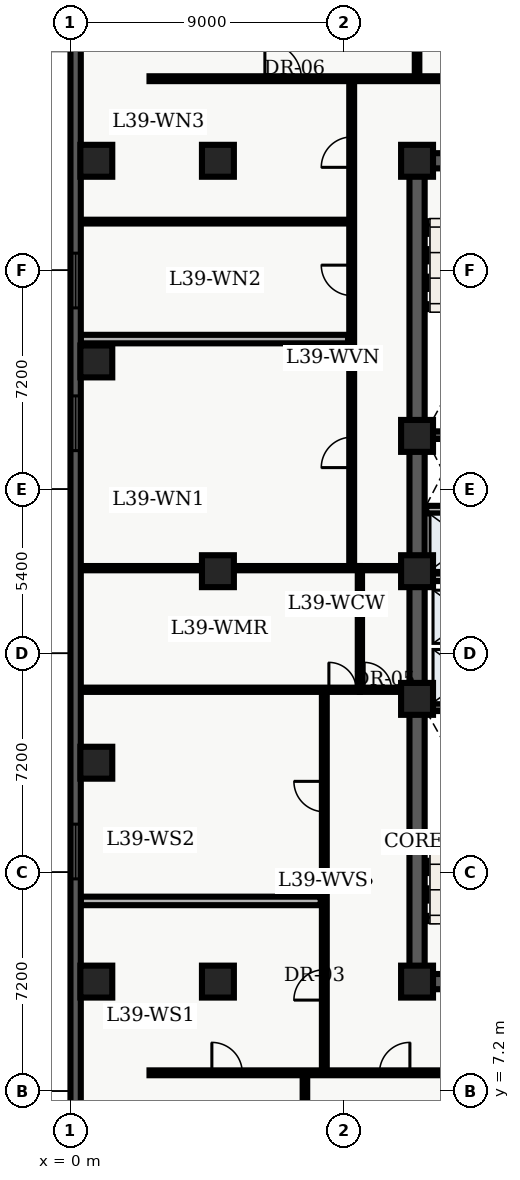
"""IFC4 building model, lengths in metres.
Left out: names, types, materials, properties, quantities, classifications, styles, units other than length and angle.
Written with IfcOpenShell. Run it as: python <this file> out.ifc"""

import sys

from ifc_helpers import new_model, entity, si_unit, converted_unit, direction, frame, origin_with_axes, origin_2d_with_axis, place, context, subcontext, project, spatial, polyline, rectangle, outline, extrude, element, fill, save


model = new_model("IFC4")
c1 = context("Model", 3, precision=1e-05, world=origin_with_axes(), true_north=direction((0.0, 1.0)))
c2 = subcontext(c1, "Body", "Model", "MODEL_VIEW")
j1 = project(units=[si_unit("LENGTHUNIT", "METRE"), converted_unit("PLANEANGLEUNIT", "DEGREE", entity("IfcPlaneAngleMeasure", 0.017), si_unit("PLANEANGLEUNIT", "RADIAN"), dimensions=[0, 0, 0, 0, 0, 0, 0])], contexts=[c1])
p1 = place(None, origin_with_axes())
s1 = spatial("IfcSite", under=j1, at=p1, CompositionType="ELEMENT")
p2 = place(p1, origin_with_axes())
s2 = spatial("IfcBuilding", under=s1, at=p2, CompositionType="ELEMENT")
p3 = place(p2, frame((0.0, 0.0, 160.2), z_axis=(0.0, 0.0, 1.0), x_axis=(1.0, 0.0, 0.0)))
s3 = spatial("IfcBuildingStorey", under=s2, at=p3, CompositionType="ELEMENT", Elevation=160.2)
p4 = place(p3, frame((11.4, 10.8, 0.0), z_axis=(0.0, 0.0, 1.0), x_axis=(0.0, 1.0, 0.0)))
e1 = element("IfcWall", 1, at=p4, inside=s3, PredefinedType="SHEAR", context=c2, shape_type="SweptSolid", body=[
    extrude(outline(polyline([(0.0, -0.25), (27.0, -0.25), (27.0, 0.25), (0.0, 0.25), (0.0, -0.25)])), origin_with_axes(), (0.0, 0.0, 1.0), 3.66),
])
p5 = place(p3, frame((11.4, 10.8, 0.0), z_axis=(0.0, 0.0, 1.0), x_axis=(1.0, 0.0, 0.0)))
e2 = element("IfcWall", 2, at=p5, inside=s3, PredefinedType="SHEAR", context=c2, shape_type="SweptSolid", body=[
    extrude(outline(polyline([(0.0, -0.25), (7.2, -0.25), (7.2, 0.25), (0.0, 0.25), (0.0, -0.25)])), origin_with_axes(), (0.0, 0.0, 1.0), 3.66),
])
p6 = place(p5, frame((2.625, 0.0, 0.0), z_axis=(0.0, 0.0, 1.0), x_axis=(1.0, 0.0, 0.0)))
e3 = element("IfcOpeningElement", 3, at=p6, cuts=e2, PredefinedType="OPENING", context=c2, shape_type="SweptSolid", body=[
    extrude(rectangle(XDim=1.05, YDim=0.52, at=origin_2d_with_axis()), origin_with_axes(), (0.0, 0.0, 1.0), 2.15),
])
p7 = place(p3, frame((11.4, 37.8, 0.0), z_axis=(0.0, 0.0, 1.0), x_axis=(1.0, 0.0, 0.0)))
e4 = element("IfcWall", 4, at=p7, inside=s3, PredefinedType="SHEAR", context=c2, shape_type="SweptSolid", body=[
    extrude(outline(polyline([(0.0, -0.25), (7.2, -0.25), (7.2, 0.25), (0.0, 0.25), (0.0, -0.25)])), origin_with_axes(), (0.0, 0.0, 1.0), 3.66),
])
p8 = place(p7, frame((2.625, 0.0, 0.0), z_axis=(0.0, 0.0, 1.0), x_axis=(1.0, 0.0, 0.0)))
e5 = element("IfcOpeningElement", 5, at=p8, cuts=e4, PredefinedType="OPENING", context=c2, shape_type="SweptSolid", body=[
    extrude(rectangle(XDim=1.05, YDim=0.52, at=origin_2d_with_axis()), origin_with_axes(), (0.0, 0.0, 1.0), 2.15),
])
for number, where, z_axis, x_axis in (
    (6, (11.65, 19.825, 0.0), (0.0, 0.0, 1.0), (1.0, 0.0, 0.0)),
    (7, (11.65, 28.775, 0.0), (0.0, 0.0, 1.0), (1.0, 0.0, 0.0)),
):
    element("IfcWall", number, at=place(p3, frame(where, z_axis=z_axis, x_axis=x_axis)), inside=s3, PredefinedType="SHEAR", context=c2, shape_type="SweptSolid", body=[
        extrude(outline(polyline([(0.0, -0.125), (6.7, -0.125), (6.7, 0.125), (0.0, 0.125), (0.0, -0.125)])), origin_with_axes(), (0.0, 0.0, 1.0), 3.66),
    ])
p9 = place(p3, frame((11.7, 24.1, 0.0), z_axis=(0.0, 0.0, 1.0), x_axis=(1.0, 0.0, 0.0)))
e8 = element("IfcWall", 8, at=p9, inside=s3, PredefinedType="SOLIDWALL", context=c2, shape_type="SweptSolid", body=[
    extrude(outline(polyline([(0.0, -0.125), (6.6, -0.125), (6.6, 0.125), (0.0, 0.125), (0.0, -0.125)])), origin_with_axes(), (0.0, 0.0, 1.0), 2.7),
])
p10 = place(p9, frame((3.75, 0.0, 0.0), z_axis=(0.0, 0.0, 1.0), x_axis=(1.0, 0.0, 0.0)))
e9 = element("IfcOpeningElement", 9, at=p10, cuts=e8, PredefinedType="OPENING", context=c2, shape_type="SweptSolid", body=[
    extrude(rectangle(XDim=0.9, YDim=0.27, at=origin_2d_with_axis()), origin_with_axes(), (0.0, 0.0, 1.0), 2.15),
])
p11 = place(p3, frame((11.7, 26.325, 0.0), z_axis=(0.0, 0.0, 1.0), x_axis=(1.0, 0.0, 0.0)))
e10 = element("IfcWall", 10, at=p11, inside=s3, PredefinedType="SOLIDWALL", context=c2, shape_type="SweptSolid", body=[
    extrude(outline(polyline([(0.0, -0.125), (6.6, -0.125), (6.6, 0.125), (0.0, 0.125), (0.0, -0.125)])), origin_with_axes(), (0.0, 0.0, 1.0), 2.7),
])
p12 = place(p11, frame((3.5, 0.0, 0.0), z_axis=(0.0, 0.0, 1.0), x_axis=(1.0, 0.0, 0.0)))
e11 = element("IfcOpeningElement", 11, at=p12, cuts=e10, PredefinedType="OPENING", context=c2, shape_type="SweptSolid", body=[
    extrude(rectangle(XDim=0.9, YDim=0.27, at=origin_2d_with_axis()), origin_with_axes(), (0.0, 0.0, 1.0), 2.15),
])
for number, where, z_axis, x_axis in (
    (12, (11.4, 10.8, 0.0), (0.0, 0.0, 1.0), (1.0, 0.0, 0.0)),
    (13, (11.4, 20.1, 0.0), (0.0, 0.0, 1.0), (1.0, 0.0, 0.0)),
    (14, (11.4, 24.3, 0.0), (0.0, 0.0, 1.0), (1.0, 0.0, 0.0)),
    (15, (11.4, 28.75, 0.0), (0.0, 0.0, 1.0), (1.0, 0.0, 0.0)),
    (16, (11.4, 37.8, 0.0), (0.0, 0.0, 1.0), (1.0, 0.0, 0.0)),
    (17, (4.85, 10.8, 0.0), (0.0, 0.0, 1.0), (1.0, 0.0, 0.0)),
    (18, (4.85, 24.3, 0.0), (0.0, 0.0, 1.0), (1.0, 0.0, 0.0)),
    (19, (4.85, 37.8, 0.0), (0.0, 0.0, 1.0), (1.0, 0.0, 0.0)),
    (20, (0.85, 10.8, 0.0), (0.0, 0.0, 1.0), (1.0, 0.0, 0.0)),
    (21, (0.85, 18.0, 0.0), (0.0, 0.0, 1.0), (1.0, 0.0, 0.0)),
    (22, (0.85, 31.2, 0.0), (0.0, 0.0, 1.0), (1.0, 0.0, 0.0)),
    (23, (0.85, 37.8, 0.0), (0.0, 0.0, 1.0), (1.0, 0.0, 0.0)),
):
    element("IfcColumn", number, at=place(p3, frame(where, z_axis=z_axis, x_axis=x_axis)), inside=s3, PredefinedType="COLUMN", context=c2, shape_type="SweptSolid", body=[
        extrude(rectangle(XDim=1.05, YDim=1.05, at=origin_2d_with_axis()), origin_with_axes(), (0.0, 0.0, 1.0), 3.9),
    ])
p13 = place(p3, frame((9.52, 20.4, 0.0), z_axis=(0.0, 0.0, 1.0), x_axis=(0.0, 1.0, 0.0)))
e24 = element("IfcWall", 24, at=p13, inside=s3, PredefinedType="PARTITIONING", context=c2, shape_type="SweptSolid", body=[
    extrude(outline(polyline([(0.0, -0.07), (4.0, -0.07), (4.0, 0.07), (0.0, 0.07), (0.0, -0.07)])), origin_with_axes(), (0.0, 0.0, 1.0), 2.7),
])
p14 = place(p3, frame((9.52, 20.4, 0.0), z_axis=(0.0, 0.0, 1.0), x_axis=(1.0, 0.0, 0.0)))
e25 = element("IfcWall", 25, at=p14, inside=s3, PredefinedType="PARTITIONING", context=c2, shape_type="SweptSolid", body=[
    extrude(outline(polyline([(0.0, -0.07), (1.58, -0.07), (1.58, 0.07), (0.0, 0.07), (0.0, -0.07)])), origin_with_axes(), (0.0, 0.0, 1.0), 2.7),
])
p15 = place(p14, frame((0.59, 0.0, 0.0), z_axis=(0.0, 0.0, 1.0), x_axis=(1.0, 0.0, 0.0)))
e26 = element("IfcOpeningElement", 26, at=p15, cuts=e25, PredefinedType="OPENING", context=c2, shape_type="SweptSolid", body=[
    extrude(rectangle(XDim=0.9, YDim=0.16, at=origin_2d_with_axis()), origin_with_axes(), (0.0, 0.0, 1.0), 2.15),
])
p16 = place(p3, frame((9.52, 24.4, 0.0), z_axis=(0.0, 0.0, 1.0), x_axis=(1.0, 0.0, 0.0)))
e27 = element("IfcWall", 27, at=p16, inside=s3, PredefinedType="PARTITIONING", context=c2, shape_type="SweptSolid", body=[
    extrude(outline(polyline([(0.0, -0.07), (1.58, -0.07), (1.58, 0.07), (0.0, 0.07), (0.0, -0.07)])), origin_with_axes(), (0.0, 0.0, 1.0), 2.7),
])
p17 = place(p3, frame((2.6, 7.8, 0.0), z_axis=(0.0, 0.0, 1.0), x_axis=(1.0, 0.0, 0.0)))
e28 = element("IfcWall", 28, at=p17, inside=s3, PredefinedType="PARTITIONING", context=c2, shape_type="SweptSolid", body=[
    extrude(outline(polyline([(0.0, -0.08), (18.55, -0.08), (18.55, 0.08), (0.0, 0.08), (0.0, -0.08)])), origin_with_axes(), (0.0, 0.0, 1.0), 2.7),
])
p18 = place(p17, frame((2.551, 0.0, 0.0), z_axis=(0.0, 0.0, 1.0), x_axis=(1.0, 0.0, 0.0)))
e29 = element("IfcOpeningElement", 29, at=p18, cuts=e28, PredefinedType="OPENING", context=c2, shape_type="SweptSolid", body=[
    extrude(rectangle(XDim=1.0, YDim=0.18, at=origin_2d_with_axis()), origin_with_axes(), (0.0, 0.0, 1.0), 2.15),
])
p19 = place(p17, frame((8.065, 0.0, 0.0), z_axis=(0.0, 0.0, 1.0), x_axis=(1.0, 0.0, 0.0)))
e30 = element("IfcOpeningElement", 30, at=p19, cuts=e28, PredefinedType="OPENING", context=c2, shape_type="SweptSolid", body=[
    extrude(rectangle(XDim=1.0, YDim=0.18, at=origin_2d_with_axis()), origin_with_axes(), (0.0, 0.0, 1.0), 2.15),
])
p20 = place(p17, frame((14.758, 0.0, 0.0), z_axis=(0.0, 0.0, 1.0), x_axis=(1.0, 0.0, 0.0)))
e31 = element("IfcOpeningElement", 31, at=p20, cuts=e28, PredefinedType="OPENING", context=c2, shape_type="SweptSolid", body=[
    extrude(rectangle(XDim=1.0, YDim=0.18, at=origin_2d_with_axis()), origin_with_axes(), (0.0, 0.0, 1.0), 2.15),
])
p21 = place(p3, frame((2.6, 40.5, 0.0), z_axis=(0.0, 0.0, 1.0), x_axis=(1.0, 0.0, 0.0)))
e32 = element("IfcWall", 32, at=p21, inside=s3, PredefinedType="PARTITIONING", context=c2, shape_type="SweptSolid", body=[
    extrude(outline(polyline([(0.0, -0.08), (20.481, -0.08), (20.481, 0.08), (0.0, 0.08), (0.0, -0.08)])), origin_with_axes(), (0.0, 0.0, 1.0), 2.7),
])
p22 = place(p21, frame((4.395, 0.0, 0.0), z_axis=(0.0, 0.0, 1.0), x_axis=(1.0, 0.0, 0.0)))
e33 = element("IfcOpeningElement", 33, at=p22, cuts=e32, PredefinedType="OPENING", context=c2, shape_type="SweptSolid", body=[
    extrude(rectangle(XDim=1.2, YDim=0.18, at=origin_2d_with_axis()), origin_with_axes(), (0.0, 0.0, 1.0), 2.2),
])
p23 = place(p21, frame((13.043, 0.0, 0.0), z_axis=(0.0, 0.0, 1.0), x_axis=(1.0, 0.0, 0.0)))
e34 = element("IfcOpeningElement", 34, at=p23, cuts=e32, PredefinedType="OPENING", context=c2, shape_type="SweptSolid", body=[
    extrude(rectangle(XDim=1.0, YDim=0.18, at=origin_2d_with_axis()), origin_with_axes(), (0.0, 0.0, 1.0), 2.15),
])
p24 = place(p3, frame((8.35, 7.8, 0.0), z_axis=(0.0, 0.0, 1.0), x_axis=(0.0, 1.0, 0.0)))
e35 = element("IfcWall", 35, at=p24, inside=s3, PredefinedType="PARTITIONING", context=c2, shape_type="SweptSolid", body=[
    extrude(outline(polyline([(0.0, -0.08), (12.6, -0.08), (12.6, 0.08), (0.0, 0.08), (0.0, -0.08)])), origin_with_axes(), (0.0, 0.0, 1.0), 2.7),
])
p25 = place(p24, frame((2.892, 0.0, 0.0), z_axis=(0.0, 0.0, 1.0), x_axis=(1.0, 0.0, 0.0)))
e36 = element("IfcOpeningElement", 36, at=p25, cuts=e35, PredefinedType="OPENING", context=c2, shape_type="SweptSolid", body=[
    extrude(rectangle(XDim=1.0, YDim=0.18, at=origin_2d_with_axis()), origin_with_axes(), (0.0, 0.0, 1.0), 2.15),
])
p26 = place(p24, frame((9.087, 0.0, 0.0), z_axis=(0.0, 0.0, 1.0), x_axis=(1.0, 0.0, 0.0)))
e37 = element("IfcOpeningElement", 37, at=p26, cuts=e35, PredefinedType="OPENING", context=c2, shape_type="SweptSolid", body=[
    extrude(rectangle(XDim=1.0, YDim=0.18, at=origin_2d_with_axis()), origin_with_axes(), (0.0, 0.0, 1.0), 2.15),
])
p27 = place(p3, frame((9.25, 24.4, 0.0), z_axis=(0.0, 0.0, 1.0), x_axis=(0.0, 1.0, 0.0)))
e38 = element("IfcWall", 38, at=p27, inside=s3, PredefinedType="PARTITIONING", context=c2, shape_type="SweptSolid", body=[
    extrude(outline(polyline([(0.0, -0.08), (16.1, -0.08), (16.1, 0.08), (0.0, 0.08), (0.0, -0.08)])), origin_with_axes(), (0.0, 0.0, 1.0), 2.7),
])
p28 = place(p27, frame((3.808, 0.0, 0.0), z_axis=(0.0, 0.0, 1.0), x_axis=(1.0, 0.0, 0.0)))
e39 = element("IfcOpeningElement", 39, at=p28, cuts=e38, PredefinedType="OPENING", context=c2, shape_type="SweptSolid", body=[
    extrude(rectangle(XDim=1.0, YDim=0.18, at=origin_2d_with_axis()), origin_with_axes(), (0.0, 0.0, 1.0), 2.15),
])
p29 = place(p27, frame((9.467, 0.0, 0.0), z_axis=(0.0, 0.0, 1.0), x_axis=(1.0, 0.0, 0.0)))
e40 = element("IfcOpeningElement", 40, at=p29, cuts=e38, PredefinedType="OPENING", context=c2, shape_type="SweptSolid", body=[
    extrude(rectangle(XDim=1.0, YDim=0.18, at=origin_2d_with_axis()), origin_with_axes(), (0.0, 0.0, 1.0), 2.15),
])
p30 = place(p27, frame((13.684, 0.0, 0.0), z_axis=(0.0, 0.0, 1.0), x_axis=(1.0, 0.0, 0.0)))
e41 = element("IfcOpeningElement", 41, at=p30, cuts=e38, PredefinedType="OPENING", context=c2, shape_type="SweptSolid", body=[
    extrude(rectangle(XDim=1.0, YDim=0.18, at=origin_2d_with_axis()), origin_with_axes(), (0.0, 0.0, 1.0), 2.15),
])
p31 = place(p3, frame((0.335, 20.4, 0.0), z_axis=(0.0, 0.0, 1.0), x_axis=(1.0, 0.0, 0.0)))
e42 = element("IfcWall", 42, at=p31, inside=s3, PredefinedType="PARTITIONING", context=c2, shape_type="SweptSolid", body=[
    extrude(outline(polyline([(0.0, -0.07), (9.185, -0.07), (9.185, 0.07), (0.0, 0.07), (0.0, -0.07)])), origin_with_axes(), (0.0, 0.0, 1.0), 2.7),
])
p32 = place(p31, frame((8.615, 0.0, 0.0), z_axis=(0.0, 0.0, 1.0), x_axis=(1.0, 0.0, 0.0)))
e43 = element("IfcOpeningElement", 43, at=p32, cuts=e42, PredefinedType="OPENING", context=c2, shape_type="SweptSolid", body=[
    extrude(rectangle(XDim=0.9, YDim=0.16, at=origin_2d_with_axis()), origin_with_axes(), (0.0, 0.0, 1.0), 2.15),
])
p33 = place(p3, frame((0.335, 24.4, 0.0), z_axis=(0.0, 0.0, 1.0), x_axis=(1.0, 0.0, 0.0)))
e44 = element("IfcWall", 44, at=p33, inside=s3, PredefinedType="PARTITIONING", context=c2, shape_type="SweptSolid", body=[
    extrude(outline(polyline([(0.0, -0.07), (9.185, -0.07), (9.185, 0.07), (0.0, 0.07), (0.0, -0.07)])), origin_with_axes(), (0.0, 0.0, 1.0), 2.7),
])
p34 = place(p3, frame((0.335, 13.454, 0.0), z_axis=(0.0, 0.0, 1.0), x_axis=(1.0, 0.0, 0.0)))
e45 = element("IfcWall", 45, at=p34, inside=s3, PredefinedType="PARTITIONING", context=c2, shape_type="SweptSolid", body=[
    extrude(outline(polyline([(0.0, -0.14), (7.895, -0.14), (7.895, 0.14), (0.0, 0.14), (0.0, -0.14)])), origin_with_axes(), (0.0, 0.0, 1.0), 2.7),
])
p35 = place(p3, frame((0.335, 31.935, 0.0), z_axis=(0.0, 0.0, 1.0), x_axis=(1.0, 0.0, 0.0)))
e46 = element("IfcWall", 46, at=p35, inside=s3, PredefinedType="PARTITIONING", context=c2, shape_type="SweptSolid", body=[
    extrude(outline(polyline([(0.0, -0.14), (8.795, -0.14), (8.795, 0.14), (0.0, 0.14), (0.0, -0.14)])), origin_with_axes(), (0.0, 0.0, 1.0), 2.7),
])
p36 = place(p3, frame((0.335, 35.799, 0.0), z_axis=(0.0, 0.0, 1.0), x_axis=(1.0, 0.0, 0.0)))
e47 = element("IfcWall", 47, at=p36, inside=s3, PredefinedType="PARTITIONING", context=c2, shape_type="SweptSolid", body=[
    extrude(outline(polyline([(0.0, -0.062), (8.795, -0.062), (8.795, 0.062), (0.0, 0.062), (0.0, -0.062)])), origin_with_axes(), (0.0, 0.0, 1.0), 2.7),
])
p37 = place(p3, frame((7.712, 0.335, 0.0), z_axis=(0.0, 0.0, 1.0), x_axis=(0.0, 1.0, 0.0)))
e48 = element("IfcWall", 48, at=p37, inside=s3, PredefinedType="PARTITIONING", context=c2, shape_type="SweptSolid", body=[
    extrude(outline(polyline([(0.0, -0.075), (7.365, -0.075), (7.365, 0.075), (0.0, 0.075), (0.0, -0.075)])), origin_with_axes(), (0.0, 0.0, 1.0), 2.7),
])
p38 = place(p3, frame((11.4, 40.6, 0.0), z_axis=(0.0, 0.0, 1.0), x_axis=(0.0, 1.0, 0.0)))
e49 = element("IfcWall", 49, at=p38, inside=s3, PredefinedType="PARTITIONING", context=c2, shape_type="SweptSolid", body=[
    extrude(outline(polyline([(0.0, -0.075), (7.665, -0.075), (7.665, 0.075), (0.0, 0.075), (0.0, -0.075)])), origin_with_axes(), (0.0, 0.0, 1.0), 2.7),
])
p39 = place(p3, frame((0.17, 2.74, 0.0), z_axis=(0.0, 0.0, 1.0), x_axis=(0.0, 1.0, 0.0)))
e50 = element("IfcWall", 50, at=p39, inside=s3, PredefinedType="SOLIDWALL", context=c2, shape_type="SweptSolid", body=[
    extrude(outline(polyline([(0.0, -0.17), (43.46, -0.17), (43.46, 0.17), (0.0, 0.17), (0.0, -0.17)])), origin_with_axes(), (0.0, 0.0, 1.0), 3.66),
])
p40 = place(p39, frame((2.948, 0.0, 0.45), z_axis=(0.0, 0.0, 1.0), x_axis=(1.0, 0.0, 0.0)))
e51 = element("IfcOpeningElement", 51, at=p40, cuts=e50, PredefinedType="OPENING", context=c2, shape_type="SweptSolid", body=[
    extrude(rectangle(XDim=1.8, YDim=0.36, at=origin_2d_with_axis()), origin_with_axes(), (0.0, 0.0, 1.0), 2.1),
])
p41 = place(p39, frame((12.339, 0.0, 0.45), z_axis=(0.0, 0.0, 1.0), x_axis=(1.0, 0.0, 0.0)))
e52 = element("IfcOpeningElement", 52, at=p41, cuts=e50, PredefinedType="OPENING", context=c2, shape_type="SweptSolid", body=[
    extrude(rectangle(XDim=1.8, YDim=0.36, at=origin_2d_with_axis()), origin_with_axes(), (0.0, 0.0, 1.0), 2.1),
])
p42 = place(p39, frame((26.426, 0.0, 0.45), z_axis=(0.0, 0.0, 1.0), x_axis=(1.0, 0.0, 0.0)))
e53 = element("IfcOpeningElement", 53, at=p42, cuts=e50, PredefinedType="OPENING", context=c2, shape_type="SweptSolid", body=[
    extrude(rectangle(XDim=1.8, YDim=0.36, at=origin_2d_with_axis()), origin_with_axes(), (0.0, 0.0, 1.0), 2.1),
])
p43 = place(p39, frame((31.121, 0.0, 0.45), z_axis=(0.0, 0.0, 1.0), x_axis=(1.0, 0.0, 0.0)))
e54 = element("IfcOpeningElement", 54, at=p43, cuts=e50, PredefinedType="OPENING", context=c2, shape_type="SweptSolid", body=[
    extrude(rectangle(XDim=1.8, YDim=0.36, at=origin_2d_with_axis()), origin_with_axes(), (0.0, 0.0, 1.0), 2.1),
])
p44 = place(p39, frame((40.062, 0.0, 0.45), z_axis=(0.0, 0.0, 1.0), x_axis=(1.0, 0.0, 0.0)))
e55 = element("IfcOpeningElement", 55, at=p44, cuts=e50, PredefinedType="OPENING", context=c2, shape_type="SweptSolid", body=[
    extrude(rectangle(XDim=1.8, YDim=0.36, at=origin_2d_with_axis()), origin_with_axes(), (0.0, 0.0, 1.0), 2.1),
])
p45 = place(p14, frame((0.59, 0.0, 0.0), z_axis=(0.0, 0.0, 1.0), x_axis=(1.0, 0.0, 0.0)))
e56 = element("IfcDoor", 56, at=p45, inside=s3, OperationType="SINGLE_SWING_LEFT", PredefinedType="DOOR", context=c2, shape_type="SweptSolid", body=[
    extrude(rectangle(XDim=0.9, YDim=0.084, at=origin_2d_with_axis()), origin_with_axes(), (0.0, 0.0, 1.0), 2.15),
])
fill(e26, e56)
p46 = place(p31, frame((8.615, 0.0, 0.0), z_axis=(0.0, 0.0, 1.0), x_axis=(1.0, 0.0, 0.0)))
e57 = element("IfcDoor", 57, at=p46, inside=s3, OperationType="SINGLE_SWING_LEFT", PredefinedType="DOOR", context=c2, shape_type="SweptSolid", body=[
    extrude(rectangle(XDim=0.9, YDim=0.084, at=origin_2d_with_axis()), origin_with_axes(), (0.0, 0.0, 1.0), 2.15),
])
fill(e43, e57)
p47 = place(p24, frame((2.892, 0.0, 0.0), z_axis=(0.0, 0.0, 1.0), x_axis=(1.0, 0.0, 0.0)))
e58 = element("IfcDoor", 58, at=p47, inside=s3, OperationType="SINGLE_SWING_LEFT", PredefinedType="DOOR", context=c2, shape_type="SweptSolid", body=[
    extrude(rectangle(XDim=1.0, YDim=0.09, at=origin_2d_with_axis()), origin_with_axes(), (0.0, 0.0, 1.0), 2.15),
])
fill(e36, e58)
p48 = place(p24, frame((9.087, 0.0, 0.0), z_axis=(0.0, 0.0, 1.0), x_axis=(1.0, 0.0, 0.0)))
e59 = element("IfcDoor", 59, at=p48, inside=s3, OperationType="SINGLE_SWING_RIGHT", PredefinedType="DOOR", context=c2, shape_type="SweptSolid", body=[
    extrude(rectangle(XDim=1.0, YDim=0.09, at=origin_2d_with_axis()), origin_with_axes(), (0.0, 0.0, 1.0), 2.15),
])
fill(e37, e59)
p49 = place(p27, frame((3.808, 0.0, 0.0), z_axis=(0.0, 0.0, 1.0), x_axis=(1.0, 0.0, 0.0)))
e60 = element("IfcDoor", 60, at=p49, inside=s3, OperationType="SINGLE_SWING_LEFT", PredefinedType="DOOR", context=c2, shape_type="SweptSolid", body=[
    extrude(rectangle(XDim=1.0, YDim=0.09, at=origin_2d_with_axis()), origin_with_axes(), (0.0, 0.0, 1.0), 2.15),
])
fill(e39, e60)
p50 = place(p27, frame((9.467, 0.0, 0.0), z_axis=(0.0, 0.0, 1.0), x_axis=(1.0, 0.0, 0.0)))
e61 = element("IfcDoor", 61, at=p50, inside=s3, OperationType="SINGLE_SWING_RIGHT", PredefinedType="DOOR", context=c2, shape_type="SweptSolid", body=[
    extrude(rectangle(XDim=1.0, YDim=0.09, at=origin_2d_with_axis()), origin_with_axes(), (0.0, 0.0, 1.0), 2.15),
])
fill(e40, e61)
p51 = place(p27, frame((13.684, 0.0, 0.0), z_axis=(0.0, 0.0, 1.0), x_axis=(1.0, 0.0, 0.0)))
e62 = element("IfcDoor", 62, at=p51, inside=s3, OperationType="SINGLE_SWING_LEFT", PredefinedType="DOOR", context=c2, shape_type="SweptSolid", body=[
    extrude(rectangle(XDim=1.0, YDim=0.09, at=origin_2d_with_axis()), origin_with_axes(), (0.0, 0.0, 1.0), 2.15),
])
fill(e41, e62)
p52 = place(p17, frame((2.551, 0.0, 0.0), z_axis=(0.0, 0.0, 1.0), x_axis=(1.0, 0.0, 0.0)))
e63 = element("IfcDoor", 63, at=p52, inside=s3, OperationType="SINGLE_SWING_LEFT", PredefinedType="DOOR", context=c2, shape_type="SweptSolid", body=[
    extrude(rectangle(XDim=1.0, YDim=0.09, at=origin_2d_with_axis()), origin_with_axes(), (0.0, 0.0, 1.0), 2.15),
])
fill(e29, e63)
p53 = place(p17, frame((8.065, 0.0, 0.0), z_axis=(0.0, 0.0, 1.0), x_axis=(1.0, 0.0, 0.0)))
e64 = element("IfcDoor", 64, at=p53, inside=s3, OperationType="SINGLE_SWING_RIGHT", PredefinedType="DOOR", context=c2, shape_type="SweptSolid", body=[
    extrude(rectangle(XDim=1.0, YDim=0.09, at=origin_2d_with_axis()), origin_with_axes(), (0.0, 0.0, 1.0), 2.15),
])
fill(e30, e64)
p54 = place(p21, frame((4.395, 0.0, 0.0), z_axis=(0.0, 0.0, 1.0), x_axis=(1.0, 0.0, 0.0)))
e65 = element("IfcDoor", 65, at=p54, inside=s3, OperationType="SINGLE_SWING_LEFT", PredefinedType="DOOR", context=c2, shape_type="SweptSolid", body=[
    extrude(rectangle(XDim=1.2, YDim=0.09, at=origin_2d_with_axis()), origin_with_axes(), (0.0, 0.0, 1.0), 2.2),
])
fill(e33, e65)
p55 = place(p39, frame((12.339, 0.0, 0.45), z_axis=(0.0, 0.0, 1.0), x_axis=(1.0, 0.0, 0.0)))
e66 = element("IfcWindow", 66, at=p55, inside=s3, PredefinedType="WINDOW", context=c2, shape_type="SweptSolid", body=[
    extrude(rectangle(XDim=1.8, YDim=0.09, at=origin_2d_with_axis()), origin_with_axes(), (0.0, 0.0, 1.0), 2.1),
])
fill(e52, e66)
p56 = place(p39, frame((26.426, 0.0, 0.45), z_axis=(0.0, 0.0, 1.0), x_axis=(1.0, 0.0, 0.0)))
e67 = element("IfcWindow", 67, at=p56, inside=s3, PredefinedType="WINDOW", context=c2, shape_type="SweptSolid", body=[
    extrude(rectangle(XDim=1.8, YDim=0.09, at=origin_2d_with_axis()), origin_with_axes(), (0.0, 0.0, 1.0), 2.1),
])
fill(e53, e67)
p57 = place(p39, frame((31.121, 0.0, 0.45), z_axis=(0.0, 0.0, 1.0), x_axis=(1.0, 0.0, 0.0)))
e68 = element("IfcWindow", 68, at=p57, inside=s3, PredefinedType="WINDOW", context=c2, shape_type="SweptSolid", body=[
    extrude(rectangle(XDim=1.8, YDim=0.09, at=origin_2d_with_axis()), origin_with_axes(), (0.0, 0.0, 1.0), 2.1),
])
fill(e54, e68)
save(model, sys.argv[1])
